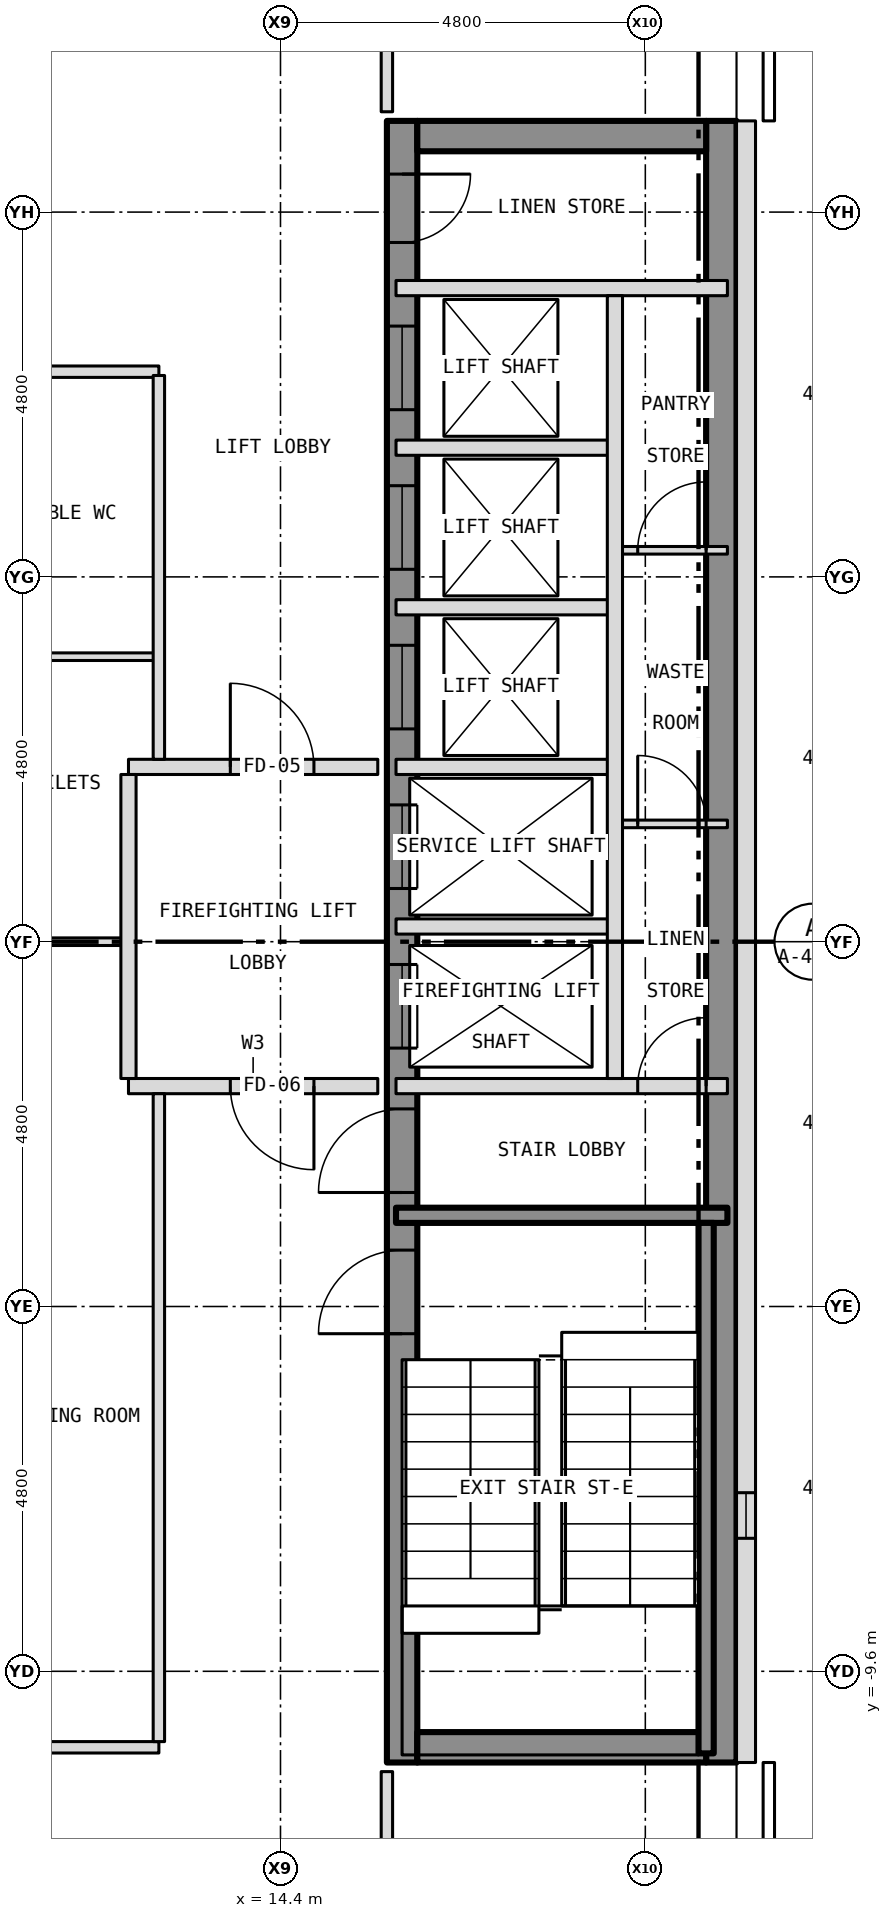
"""IFC4 building model, lengths in metres.
Left out: names, types, materials, properties, quantities, classifications, styles, units other than length and angle.
Written with IfcOpenShell. Run it as: python <this file> out.ifc"""

import sys

from ifc_helpers import new_model, si_unit, direction, frame, frame_2d, origin, place, context, subcontext, project, spatial, rectangle, extrude, element, fill, save


model = new_model("IFC4")
c1 = context("Model", 3, precision=1e-05, world=origin(), true_north=direction((0.0, 1.0)))
c2 = subcontext(c1, "Body", "Model", "MODEL_VIEW")
j1 = project(units=[si_unit("LENGTHUNIT", "METRE"), si_unit("PLANEANGLEUNIT", "RADIAN")], contexts=[c1])
p1 = place(None, origin())
s1 = spatial("IfcSite", under=j1, at=p1, CompositionType="ELEMENT")
p2 = place(p1, origin())
s2 = spatial("IfcBuilding", under=s1, at=p2, CompositionType="ELEMENT")
p3 = place(p2, frame((0.0, 0.0, 194.5)))
s3 = spatial("IfcBuildingStorey", under=s2, at=p3, CompositionType="ELEMENT", Elevation=194.5)
p4 = place(p3, frame((16.0, -10.8, 0.0), z_axis=(0.0, 0.0, 1.0), x_axis=(0.0, 1.0, 0.0)))
e1 = element("IfcWall", 1, at=p4, inside=s3, PredefinedType="SHEAR", context=c2, shape_type="SweptSolid", body=[
    extrude(rectangle(XDim=21.6, YDim=0.4, at=frame_2d((10.8, 0.0))), origin(), (0.0, 0.0, 1.0), 3.25),
])
p5 = place(p4, frame((9.4, 0.0, 0.0)))
e2 = element("IfcOpeningElement", 2, at=p5, cuts=e1, PredefinedType="OPENING", context=c2, shape_type="SweptSolid", body=[
    extrude(rectangle(XDim=1.1, YDim=2.1, at=frame_2d((0.55, 1.05))), frame((0.0, 0.212, 0.0), z_axis=(0.0, -1.0, 0.0), x_axis=(1.0, 0.0, 0.0)), (0.0, 0.0, 1.0), 0.424),
])
p6 = place(p4, frame((11.5, 0.0, 0.0)))
e3 = element("IfcOpeningElement", 3, at=p6, cuts=e1, PredefinedType="OPENING", context=c2, shape_type="SweptSolid", body=[
    extrude(rectangle(XDim=1.1, YDim=2.1, at=frame_2d((0.55, 1.05))), frame((0.0, 0.212, 0.0), z_axis=(0.0, -1.0, 0.0), x_axis=(1.0, 0.0, 0.0)), (0.0, 0.0, 1.0), 0.424),
])
p7 = place(p4, frame((13.6, 0.0, 0.0)))
e4 = element("IfcOpeningElement", 4, at=p7, cuts=e1, PredefinedType="OPENING", context=c2, shape_type="SweptSolid", body=[
    extrude(rectangle(XDim=1.1, YDim=2.1, at=frame_2d((0.55, 1.05))), frame((0.0, 0.212, 0.0), z_axis=(0.0, -1.0, 0.0), x_axis=(1.0, 0.0, 0.0)), (0.0, 0.0, 1.0), 0.424),
])
p8 = place(p4, frame((15.7, 0.0, 0.0)))
e5 = element("IfcOpeningElement", 5, at=p8, cuts=e1, PredefinedType="OPENING", context=c2, shape_type="SweptSolid", body=[
    extrude(rectangle(XDim=1.1, YDim=2.1, at=frame_2d((0.55, 1.05))), frame((0.0, 0.212, 0.0), z_axis=(0.0, -1.0, 0.0), x_axis=(1.0, 0.0, 0.0)), (0.0, 0.0, 1.0), 0.424),
])
p9 = place(p4, frame((17.8, 0.0, 0.0)))
e6 = element("IfcOpeningElement", 6, at=p9, cuts=e1, PredefinedType="OPENING", context=c2, shape_type="SweptSolid", body=[
    extrude(rectangle(XDim=1.1, YDim=2.1, at=frame_2d((0.55, 1.05))), frame((0.0, 0.212, 0.0), z_axis=(0.0, -1.0, 0.0), x_axis=(1.0, 0.0, 0.0)), (0.0, 0.0, 1.0), 0.424),
])
p10 = place(p4, frame((5.642, 0.0, 0.0)))
e7 = element("IfcOpeningElement", 7, at=p10, cuts=e1, PredefinedType="OPENING", context=c2, shape_type="SweptSolid", body=[
    extrude(rectangle(XDim=1.1, YDim=2.1, at=frame_2d((0.55, 1.05))), frame((0.0, 0.212, 0.0), z_axis=(0.0, -1.0, 0.0), x_axis=(1.0, 0.0, 0.0)), (0.0, 0.0, 1.0), 0.424),
])
p11 = place(p4, frame((7.5, 0.0, 0.0)))
e8 = element("IfcOpeningElement", 8, at=p11, cuts=e1, PredefinedType="OPENING", context=c2, shape_type="SweptSolid", body=[
    extrude(rectangle(XDim=1.1, YDim=2.1, at=frame_2d((0.55, 1.05))), frame((0.0, 0.212, 0.0), z_axis=(0.0, -1.0, 0.0), x_axis=(1.0, 0.0, 0.0)), (0.0, 0.0, 1.0), 0.424),
])
p12 = place(p4, frame((20.0, 0.0, 0.0)))
e9 = element("IfcOpeningElement", 9, at=p12, cuts=e1, PredefinedType="OPENING", context=c2, shape_type="SweptSolid", body=[
    extrude(rectangle(XDim=0.9, YDim=2.1, at=frame_2d((0.45, 1.05))), frame((0.0, 0.212, 0.0), z_axis=(0.0, -1.0, 0.0), x_axis=(1.0, 0.0, 0.0)), (0.0, 0.0, 1.0), 0.424),
])
p13 = place(p3, frame((20.2, -10.8, 0.0), z_axis=(0.0, 0.0, 1.0), x_axis=(0.0, 1.0, 0.0)))
e10 = element("IfcWall", 10, at=p13, inside=s3, PredefinedType="SHEAR", context=c2, shape_type="SweptSolid", body=[
    extrude(rectangle(XDim=21.6, YDim=0.4, at=frame_2d((10.8, 0.0))), origin(), (0.0, 0.0, 1.0), 3.25),
])
for number, where, z_axis, x_axis in (
    (11, (16.2, 10.6, 0.0), (0.0, 0.0, 1.0), (1.0, 0.0, 0.0)),
    (12, (16.2, -10.6, 0.0), (0.0, 0.0, 1.0), (1.0, 0.0, 0.0)),
):
    element("IfcWall", number, at=place(p3, frame(where, z_axis=z_axis, x_axis=x_axis)), inside=s3, PredefinedType="SHEAR", context=c2, shape_type="SweptSolid", body=[
        extrude(rectangle(XDim=3.8, YDim=0.4, at=frame_2d((1.9, 0.0))), origin(), (0.0, 0.0, 1.0), 3.25),
    ])
p14 = place(p3, frame((20.525, -10.8, 0.0), z_axis=(0.0, 0.0, 1.0), x_axis=(0.0, 1.0, 0.0)))
e13 = element("IfcWall", 13, at=p14, inside=s3, PredefinedType="SOLIDWALL", context=c2, shape_type="SweptSolid", body=[
    extrude(rectangle(XDim=21.6, YDim=0.25, at=frame_2d((10.8, 0.0))), origin(), (0.0, 0.0, 1.0), 3.5),
])
p15 = place(p14, frame((2.95, 0.0, 1.0)))
e14 = element("IfcOpeningElement", 14, at=p15, cuts=e13, PredefinedType="OPENING", context=c2, shape_type="SweptSolid", body=[
    extrude(rectangle(XDim=0.6, YDim=1.5, at=frame_2d((0.3, 0.75))), frame((0.0, 0.137, 0.0), z_axis=(0.0, -1.0, 0.0), x_axis=(1.0, 0.0, 0.0)), (0.0, 0.0, 1.0), 0.274),
])
p16 = place(p3, frame((9.7, -10.6, 0.0), z_axis=(0.0, 0.0, 1.0), x_axis=(1.0, 0.0, 0.0)))
e15 = element("IfcWall", 15, at=p16, inside=s3, PredefinedType="PARTITIONING", context=c2, shape_type="SweptSolid", body=[
    extrude(rectangle(XDim=3.1, YDim=0.15, at=frame_2d((1.55, 0.0))), origin(), (0.0, 0.0, 1.0), 3.35),
])
p17 = place(p3, frame((15.92, -3.6, 0.0), z_axis=(0.0, 0.0, 1.0), x_axis=(1.0, 0.0, 0.0)))
e16 = element("IfcWall", 16, at=p17, inside=s3, PredefinedType="SHEAR", context=c2, shape_type="SweptSolid", body=[
    extrude(rectangle(XDim=4.36, YDim=0.2, at=frame_2d((2.18, 0.0))), origin(), (0.0, 0.0, 1.0), 3.25),
])
p18 = place(p3, frame((12.4, -1.9, 0.0), z_axis=(0.0, 0.0, 1.0), x_axis=(1.0, 0.0, 0.0)))
e17 = element("IfcWall", 17, at=p18, inside=s3, PredefinedType="PARTITIONING", context=c2, shape_type="SweptSolid", body=[
    extrude(rectangle(XDim=3.28, YDim=0.2, at=frame_2d((1.64, 0.0))), origin(), (0.0, 0.0, 1.0), 3.35),
])
p19 = place(p18, frame((1.34, 0.0, 0.0)))
e18 = element("IfcOpeningElement", 18, at=p19, cuts=e17, PredefinedType="OPENING", context=c2, shape_type="SweptSolid", body=[
    extrude(rectangle(XDim=1.1, YDim=2.1, at=frame_2d((0.55, 1.05))), frame((0.0, 0.112, 0.0), z_axis=(0.0, -1.0, 0.0), x_axis=(1.0, 0.0, 0.0)), (0.0, 0.0, 1.0), 0.224),
])
p20 = place(p3, frame((15.92, -1.9, 0.0), z_axis=(0.0, 0.0, 1.0), x_axis=(1.0, 0.0, 0.0)))
e19 = element("IfcWall", 19, at=p20, inside=s3, PredefinedType="PARTITIONING", context=c2, shape_type="SweptSolid", body=[
    extrude(rectangle(XDim=4.36, YDim=0.2, at=frame_2d((2.18, 0.0))), origin(), (0.0, 0.0, 1.0), 3.25),
])
p21 = place(p20, frame((3.18, 0.0, 0.0)))
e20 = element("IfcOpeningElement", 20, at=p21, cuts=e19, PredefinedType="OPENING", context=c2, shape_type="SweptSolid", body=[
    extrude(rectangle(XDim=0.9, YDim=2.1, at=frame_2d((0.45, 1.05))), frame((0.0, 0.112, 0.0), z_axis=(0.0, -1.0, 0.0), x_axis=(1.0, 0.0, 0.0)), (0.0, 0.0, 1.0), 0.224),
])
p22 = place(p3, frame((9.7, 0.0, 0.0), z_axis=(0.0, 0.0, 1.0), x_axis=(1.0, 0.0, 0.0)))
e21 = element("IfcWall", 21, at=p22, inside=s3, PredefinedType="PARTITIONING", context=c2, shape_type="SweptSolid", body=[
    extrude(rectangle(XDim=2.7, YDim=0.1, at=frame_2d((1.35, 0.0))), origin(), (0.0, 0.0, 1.0), 2.728),
])
p23 = place(p3, frame((15.92, 0.2, 0.0), z_axis=(0.0, 0.0, 1.0), x_axis=(1.0, 0.0, 0.0)))
e22 = element("IfcWall", 22, at=p23, inside=s3, PredefinedType="PARTITIONING", context=c2, shape_type="SweptSolid", body=[
    extrude(rectangle(XDim=2.88, YDim=0.2, at=frame_2d((1.44, 0.0))), origin(), (0.0, 0.0, 1.0), 3.25),
])
p24 = place(p3, frame((18.8, 1.55, 0.0), z_axis=(0.0, 0.0, 1.0), x_axis=(1.0, 0.0, 0.0)))
e23 = element("IfcWall", 23, at=p24, inside=s3, PredefinedType="PARTITIONING", context=c2, shape_type="SweptSolid", body=[
    extrude(rectangle(XDim=1.48, YDim=0.1, at=frame_2d((0.74, 0.0))), origin(), (0.0, 0.0, 1.0), 3.25),
])
p25 = place(p24, frame((0.3, 0.0, 0.0)))
e24 = element("IfcOpeningElement", 24, at=p25, cuts=e23, PredefinedType="OPENING", context=c2, shape_type="SweptSolid", body=[
    extrude(rectangle(XDim=0.9, YDim=2.1, at=frame_2d((0.45, 1.05))), frame((0.0, 0.062, 0.0), z_axis=(0.0, -1.0, 0.0), x_axis=(1.0, 0.0, 0.0)), (0.0, 0.0, 1.0), 0.124),
])
p26 = place(p3, frame((12.4, 2.3, 0.0), z_axis=(0.0, 0.0, 1.0), x_axis=(1.0, 0.0, 0.0)))
e25 = element("IfcWall", 25, at=p26, inside=s3, PredefinedType="PARTITIONING", context=c2, shape_type="SweptSolid", body=[
    extrude(rectangle(XDim=3.28, YDim=0.2, at=frame_2d((1.64, 0.0))), origin(), (0.0, 0.0, 1.0), 3.35),
])
p27 = place(p26, frame((1.34, 0.0, 0.0)))
e26 = element("IfcOpeningElement", 26, at=p27, cuts=e25, PredefinedType="OPENING", context=c2, shape_type="SweptSolid", body=[
    extrude(rectangle(XDim=1.1, YDim=2.1, at=frame_2d((0.55, 1.05))), frame((0.0, 0.112, 0.0), z_axis=(0.0, -1.0, 0.0), x_axis=(1.0, 0.0, 0.0)), (0.0, 0.0, 1.0), 0.224),
])
p28 = place(p3, frame((15.92, 2.3, 0.0), z_axis=(0.0, 0.0, 1.0), x_axis=(1.0, 0.0, 0.0)))
e27 = element("IfcWall", 27, at=p28, inside=s3, PredefinedType="PARTITIONING", context=c2, shape_type="SweptSolid", body=[
    extrude(rectangle(XDim=2.88, YDim=0.2, at=frame_2d((1.44, 0.0))), origin(), (0.0, 0.0, 1.0), 3.25),
])
p29 = place(p3, frame((9.7, 3.75, 0.0), z_axis=(0.0, 0.0, 1.0), x_axis=(1.0, 0.0, 0.0)))
e28 = element("IfcWall", 28, at=p29, inside=s3, PredefinedType="PARTITIONING", context=c2, shape_type="SweptSolid", body=[
    extrude(rectangle(XDim=3.1, YDim=0.1, at=frame_2d((1.55, 0.0))), origin(), (0.0, 0.0, 1.0), 3.35),
])
p30 = place(p3, frame((15.92, 4.4, 0.0), z_axis=(0.0, 0.0, 1.0), x_axis=(1.0, 0.0, 0.0)))
e29 = element("IfcWall", 29, at=p30, inside=s3, PredefinedType="PARTITIONING", context=c2, shape_type="SweptSolid", body=[
    extrude(rectangle(XDim=2.88, YDim=0.2, at=frame_2d((1.44, 0.0))), origin(), (0.0, 0.0, 1.0), 3.25),
])
p31 = place(p3, frame((18.8, 5.15, 0.0), z_axis=(0.0, 0.0, 1.0), x_axis=(1.0, 0.0, 0.0)))
e30 = element("IfcWall", 30, at=p31, inside=s3, PredefinedType="PARTITIONING", context=c2, shape_type="SweptSolid", body=[
    extrude(rectangle(XDim=1.48, YDim=0.1, at=frame_2d((0.74, 0.0))), origin(), (0.0, 0.0, 1.0), 3.25),
])
p32 = place(p31, frame((0.3, 0.0, 0.0)))
e31 = element("IfcOpeningElement", 31, at=p32, cuts=e30, PredefinedType="OPENING", context=c2, shape_type="SweptSolid", body=[
    extrude(rectangle(XDim=0.9, YDim=2.1, at=frame_2d((0.45, 1.05))), frame((0.0, 0.062, 0.0), z_axis=(0.0, -1.0, 0.0), x_axis=(1.0, 0.0, 0.0)), (0.0, 0.0, 1.0), 0.124),
])
p33 = place(p3, frame((15.92, 6.5, 0.0), z_axis=(0.0, 0.0, 1.0), x_axis=(1.0, 0.0, 0.0)))
e32 = element("IfcWall", 32, at=p33, inside=s3, PredefinedType="PARTITIONING", context=c2, shape_type="SweptSolid", body=[
    extrude(rectangle(XDim=2.88, YDim=0.2, at=frame_2d((1.44, 0.0))), origin(), (0.0, 0.0, 1.0), 3.25),
])
p34 = place(p3, frame((9.7, 7.5, 0.0), z_axis=(0.0, 0.0, 1.0), x_axis=(1.0, 0.0, 0.0)))
e33 = element("IfcWall", 33, at=p34, inside=s3, PredefinedType="PARTITIONING", context=c2, shape_type="SweptSolid", body=[
    extrude(rectangle(XDim=3.1, YDim=0.15, at=frame_2d((1.55, 0.0))), origin(), (0.0, 0.0, 1.0), 3.35),
])
p35 = place(p3, frame((15.92, 8.6, 0.0), z_axis=(0.0, 0.0, 1.0), x_axis=(1.0, 0.0, 0.0)))
e34 = element("IfcWall", 34, at=p35, inside=s3, PredefinedType="PARTITIONING", context=c2, shape_type="SweptSolid", body=[
    extrude(rectangle(XDim=4.36, YDim=0.2, at=frame_2d((2.18, 0.0))), origin(), (0.0, 0.0, 1.0), 3.25),
])
p36 = place(p3, frame((12.4, -1.8, 0.0), z_axis=(0.0, 0.0, 1.0), x_axis=(0.0, 1.0, 0.0)))
e35 = element("IfcWall", 35, at=p36, inside=s3, PredefinedType="PARTITIONING", context=c2, shape_type="SweptSolid", body=[
    extrude(rectangle(XDim=4.0, YDim=0.2, at=frame_2d((2.0, 0.0))), origin(), (0.0, 0.0, 1.0), 3.35),
])
p37 = place(p3, frame((12.8, -10.525, 0.0), z_axis=(0.0, 0.0, 1.0), x_axis=(0.0, 1.0, 0.0)))
e36 = element("IfcWall", 36, at=p37, inside=s3, PredefinedType="PARTITIONING", context=c2, shape_type="SweptSolid", body=[
    extrude(rectangle(XDim=8.525, YDim=0.15, at=frame_2d((4.262, 0.0))), origin(), (0.0, 0.0, 1.0), 3.35),
])
p38 = place(p3, frame((12.8, 2.4, 0.0), z_axis=(0.0, 0.0, 1.0), x_axis=(0.0, 1.0, 0.0)))
e37 = element("IfcWall", 37, at=p38, inside=s3, PredefinedType="PARTITIONING", context=c2, shape_type="SweptSolid", body=[
    extrude(rectangle(XDim=5.05, YDim=0.15, at=frame_2d((2.525, 0.0))), origin(), (0.0, 0.0, 1.0), 3.35),
])
for number, where, z_axis, x_axis in (
    (38, (15.8, -12.725, 0.0), (0.0, 0.0, 1.0), (0.0, 1.0, 0.0)),
    (39, (15.8, 10.92, 0.0), (0.0, 0.0, 1.0), (0.0, 1.0, 0.0)),
):
    element("IfcWall", number, at=place(p3, frame(where, z_axis=z_axis, x_axis=x_axis)), inside=s3, PredefinedType="PARTITIONING", context=c2, shape_type="SweptSolid", body=[
        extrude(rectangle(XDim=1.805, YDim=0.15, at=frame_2d((0.903, 0.0))), origin(), (0.0, 0.0, 1.0), 3.35),
    ])
p39 = place(p3, frame((18.8, -1.8, 0.0), z_axis=(0.0, 0.0, 1.0), x_axis=(0.0, 1.0, 0.0)))
e40 = element("IfcWall", 40, at=p39, inside=s3, PredefinedType="PARTITIONING", context=c2, shape_type="SweptSolid", body=[
    extrude(rectangle(XDim=10.3, YDim=0.2, at=frame_2d((5.15, 0.0))), origin(), (0.0, 0.0, 1.0), 3.25),
])
p40 = place(p3, frame((20.0, -10.68, 0.0), z_axis=(0.0, 0.0, 1.0), x_axis=(0.0, 1.0, 0.0)))
e41 = element("IfcWall", 41, at=p40, inside=s3, PredefinedType="SHEAR", context=c2, shape_type="SweptSolid", body=[
    extrude(rectangle(XDim=6.98, YDim=0.2, at=frame_2d((3.49, 0.0))), origin(), (0.0, 0.0, 1.0), 3.25),
])
p41 = place(p15, origin())
e42 = element("IfcWindow", 42, at=p41, inside=s3, PartitioningType="SINGLE_PANEL", PredefinedType="WINDOW", context=c2, shape_type="SweptSolid", body=[
    extrude(rectangle(XDim=0.6, YDim=1.5, at=frame_2d((0.3, 0.75))), frame((0.0, -0.035, 0.0), z_axis=(0.0, -1.0, 0.0), x_axis=(1.0, 0.0, 0.0)), (0.0, 0.0, 1.0), 0.06),
])
fill(e14, e42)
p42 = place(p5, origin())
e43 = element("IfcDoor", 43, at=p42, inside=s3, OperationType="SLIDING_TO_LEFT", PredefinedType="DOOR", context=c2, shape_type="SweptSolid", body=[
    extrude(rectangle(XDim=1.1, YDim=2.1, at=frame_2d((0.55, 1.05))), frame((0.0, 0.025, 0.0), z_axis=(0.0, -1.0, 0.0), x_axis=(1.0, 0.0, 0.0)), (0.0, 0.0, 1.0), 0.05),
])
fill(e2, e43)
p43 = place(p6, origin())
e44 = element("IfcDoor", 44, at=p43, inside=s3, OperationType="SLIDING_TO_LEFT", PredefinedType="DOOR", context=c2, shape_type="SweptSolid", body=[
    extrude(rectangle(XDim=1.1, YDim=2.1, at=frame_2d((0.55, 1.05))), frame((0.0, 0.025, 0.0), z_axis=(0.0, -1.0, 0.0), x_axis=(1.0, 0.0, 0.0)), (0.0, 0.0, 1.0), 0.05),
])
fill(e3, e44)
p44 = place(p7, origin())
e45 = element("IfcDoor", 45, at=p44, inside=s3, OperationType="SLIDING_TO_LEFT", PredefinedType="DOOR", context=c2, shape_type="SweptSolid", body=[
    extrude(rectangle(XDim=1.1, YDim=2.1, at=frame_2d((0.55, 1.05))), frame((0.0, 0.025, 0.0), z_axis=(0.0, -1.0, 0.0), x_axis=(1.0, 0.0, 0.0)), (0.0, 0.0, 1.0), 0.05),
])
fill(e4, e45)
p45 = place(p8, origin())
e46 = element("IfcDoor", 46, at=p45, inside=s3, OperationType="SLIDING_TO_LEFT", PredefinedType="DOOR", context=c2, shape_type="SweptSolid", body=[
    extrude(rectangle(XDim=1.1, YDim=2.1, at=frame_2d((0.55, 1.05))), frame((0.0, 0.025, 0.0), z_axis=(0.0, -1.0, 0.0), x_axis=(1.0, 0.0, 0.0)), (0.0, 0.0, 1.0), 0.05),
])
fill(e5, e46)
p46 = place(p9, origin())
e47 = element("IfcDoor", 47, at=p46, inside=s3, OperationType="SLIDING_TO_LEFT", PredefinedType="DOOR", context=c2, shape_type="SweptSolid", body=[
    extrude(rectangle(XDim=1.1, YDim=2.1, at=frame_2d((0.55, 1.05))), frame((0.0, 0.025, 0.0), z_axis=(0.0, -1.0, 0.0), x_axis=(1.0, 0.0, 0.0)), (0.0, 0.0, 1.0), 0.05),
])
fill(e6, e47)
p47 = place(p10, origin())
e48 = element("IfcDoor", 48, at=p47, inside=s3, OperationType="SINGLE_SWING_LEFT", PredefinedType="DOOR", context=c2, shape_type="SweptSolid", body=[
    extrude(rectangle(XDim=1.1, YDim=2.1, at=frame_2d((0.55, 1.05))), frame((0.0, 0.025, 0.0), z_axis=(0.0, -1.0, 0.0), x_axis=(1.0, 0.0, 0.0)), (0.0, 0.0, 1.0), 0.05),
])
fill(e7, e48)
p48 = place(p11, origin())
e49 = element("IfcDoor", 49, at=p48, inside=s3, OperationType="SINGLE_SWING_LEFT", PredefinedType="DOOR", context=c2, shape_type="SweptSolid", body=[
    extrude(rectangle(XDim=1.1, YDim=2.1, at=frame_2d((0.55, 1.05))), frame((0.0, 0.025, 0.0), z_axis=(0.0, -1.0, 0.0), x_axis=(1.0, 0.0, 0.0)), (0.0, 0.0, 1.0), 0.05),
])
fill(e8, e49)
p49 = place(p12, origin())
e50 = element("IfcDoor", 50, at=p49, inside=s3, OperationType="SINGLE_SWING_RIGHT", PredefinedType="DOOR", context=c2, shape_type="SweptSolid", body=[
    extrude(rectangle(XDim=0.9, YDim=2.1, at=frame_2d((0.45, 1.05))), frame((0.0, 0.025, 0.0), z_axis=(0.0, -1.0, 0.0), x_axis=(1.0, 0.0, 0.0)), (0.0, 0.0, 1.0), 0.05),
])
fill(e9, e50)
p50 = place(p21, origin())
e51 = element("IfcDoor", 51, at=p50, inside=s3, OperationType="SINGLE_SWING_RIGHT", PredefinedType="DOOR", context=c2, shape_type="SweptSolid", body=[
    extrude(rectangle(XDim=0.9, YDim=2.1, at=frame_2d((0.45, 1.05))), frame((0.0, 0.025, 0.0), z_axis=(0.0, -1.0, 0.0), x_axis=(1.0, 0.0, 0.0)), (0.0, 0.0, 1.0), 0.05),
])
fill(e20, e51)
p51 = place(p25, origin())
e52 = element("IfcDoor", 52, at=p51, inside=s3, OperationType="SINGLE_SWING_LEFT", PredefinedType="DOOR", context=c2, shape_type="SweptSolid", body=[
    extrude(rectangle(XDim=0.9, YDim=2.1, at=frame_2d((0.45, 1.05))), frame((0.0, 0.025, 0.0), z_axis=(0.0, -1.0, 0.0), x_axis=(1.0, 0.0, 0.0)), (0.0, 0.0, 1.0), 0.05),
])
fill(e24, e52)
p52 = place(p32, origin())
e53 = element("IfcDoor", 53, at=p52, inside=s3, OperationType="SINGLE_SWING_RIGHT", PredefinedType="DOOR", context=c2, shape_type="SweptSolid", body=[
    extrude(rectangle(XDim=0.9, YDim=2.1, at=frame_2d((0.45, 1.05))), frame((0.0, 0.025, 0.0), z_axis=(0.0, -1.0, 0.0), x_axis=(1.0, 0.0, 0.0)), (0.0, 0.0, 1.0), 0.05),
])
fill(e31, e53)
p53 = place(p27, origin())
e54 = element("IfcDoor", 54, at=p53, inside=s3, OperationType="SINGLE_SWING_LEFT", PredefinedType="DOOR", context=c2, shape_type="SweptSolid", body=[
    extrude(rectangle(XDim=1.1, YDim=2.1, at=frame_2d((0.55, 1.05))), frame((0.0, 0.025, 0.0), z_axis=(0.0, -1.0, 0.0), x_axis=(1.0, 0.0, 0.0)), (0.0, 0.0, 1.0), 0.05),
])
fill(e26, e54)
p54 = place(p19, origin())
e55 = element("IfcDoor", 55, at=p54, inside=s3, OperationType="SINGLE_SWING_RIGHT", PredefinedType="DOOR", context=c2, shape_type="SweptSolid", body=[
    extrude(rectangle(XDim=1.1, YDim=2.1, at=frame_2d((0.55, 1.05))), frame((0.0, 0.025, 0.0), z_axis=(0.0, -1.0, 0.0), x_axis=(1.0, 0.0, 0.0)), (0.0, 0.0, 1.0), 0.05),
])
fill(e18, e55)
save(model, sys.argv[1])
